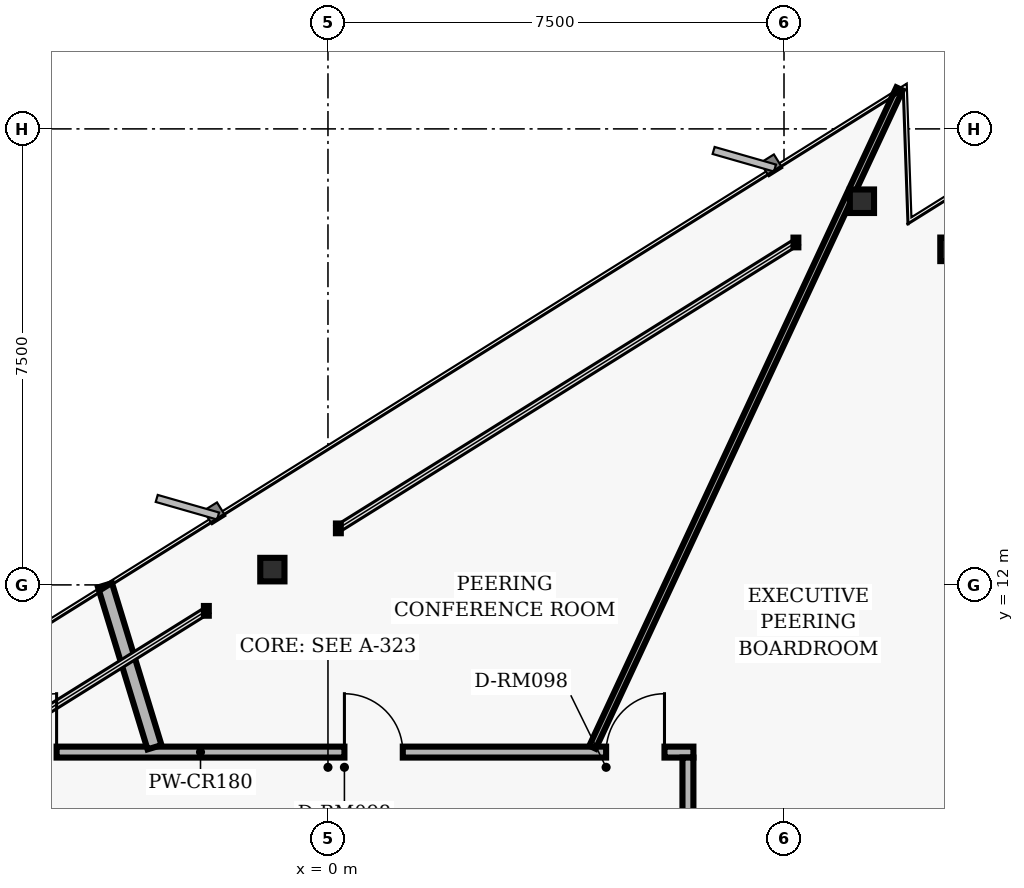
"""IFC4 building model, lengths in metres.
Left out: names, types, materials, properties, quantities, classifications, styles, units other than length and angle.
Written with IfcOpenShell. Run it as: python <this file> out.ifc"""

import sys

from ifc_helpers import new_model, si_unit, direction, frame, frame_2d, origin, origin_2d, place, context, subcontext, project, spatial, rectangle, i_section, extrude, element, fill, save


model = new_model("IFC4")
c1 = context("Model", 3, precision=1e-05, world=origin(), true_north=direction((0.0, 1.0)))
c2 = subcontext(c1, "Body", "Model", "MODEL_VIEW")
j1 = project(units=[si_unit("LENGTHUNIT", "METRE"), si_unit("PLANEANGLEUNIT", "RADIAN")], contexts=[c1])
p1 = place(None, origin())
s1 = spatial("IfcSite", under=j1, at=p1, CompositionType="ELEMENT")
p2 = place(p1, origin())
s2 = spatial("IfcBuilding", under=s1, at=p2, CompositionType="ELEMENT")
p3 = place(p2, frame((0.0, 0.0, 193.6)))
s3 = spatial("IfcBuildingStorey", under=s2, at=p3, CompositionType="ELEMENT", Elevation=193.6)
for number, where, z_axis, x_axis in (
    (1, (10.269, 17.519, 0.0), (0.0, 0.0, 1.0), (1.0, 0.0, 0.0)),
    (2, (8.781, 18.31, 0.0), (0.0, 0.0, 1.0), (1.0, 0.0, 0.0)),
    (3, (-0.915, 12.251, 0.0), (0.0, 0.0, 1.0), (1.0, 0.0, 0.0)),
):
    element("IfcColumn", number, at=place(p3, frame(where, z_axis=z_axis, x_axis=x_axis)), inside=s3, PredefinedType="COLUMN", context=c2, shape_type="SweptSolid", body=[
        extrude(i_section(OverallWidth=0.398, OverallDepth=0.387, WebThickness=0.021, FlangeThickness=0.033, FilletRadius=0.018, at=origin_2d()), origin(), (0.0, 0.0, 1.0), 3.04),
    ])
p4 = place(p3, frame((-7.29, 9.25, 0.0), z_axis=(0.0, 0.0, 1.0), x_axis=(1.0, 0.0, 0.0)))
e4 = element("IfcWall", 4, at=p4, inside=s3, PredefinedType="PARTITIONING", context=c2, shape_type="SweptSolid", body=[
    extrude(rectangle(XDim=13.3, YDim=0.18, at=frame_2d((6.65, 0.0))), origin(), (0.0, 0.0, 1.0), 2.773),
])
p5 = place(p4, frame((11.864, 0.0, 0.0)))
e5 = element("IfcOpeningElement", 5, at=p5, cuts=e4, PredefinedType="OPENING", context=c2, shape_type="SweptSolid", body=[
    extrude(rectangle(XDim=0.96, YDim=2.02, at=frame_2d((0.48, 1.01))), frame((0.0, 0.1, 0.0), z_axis=(0.0, -1.0, 0.0), x_axis=(1.0, 0.0, 0.0)), (0.0, 0.0, 1.0), 0.2),
])
p6 = place(p4, frame((7.561, 0.0, 0.0)))
e6 = element("IfcOpeningElement", 6, at=p6, cuts=e4, PredefinedType="OPENING", context=c2, shape_type="SweptSolid", body=[
    extrude(rectangle(XDim=0.96, YDim=2.02, at=frame_2d((0.48, 1.01))), frame((0.0, 0.1, 0.0), z_axis=(0.0, -1.0, 0.0), x_axis=(1.0, 0.0, 0.0)), (0.0, 0.0, 1.0), 0.2),
])
p7 = place(p4, frame((1.867, 0.0, 0.0)))
e7 = element("IfcOpeningElement", 7, at=p7, cuts=e4, PredefinedType="OPENING", context=c2, shape_type="SweptSolid", body=[
    extrude(rectangle(XDim=0.96, YDim=2.02, at=frame_2d((0.48, 1.01))), frame((0.0, 0.1, 0.0), z_axis=(0.0, -1.0, 0.0), x_axis=(1.0, 0.0, 0.0)), (0.0, 0.0, 1.0), 0.2),
])
p8 = place(p3, frame((5.92, 9.16, 0.0), z_axis=(0.0, 0.0, 1.0), x_axis=(0.0, -1.0, 0.0)))
e8 = element("IfcWall", 8, at=p8, inside=s3, PredefinedType="PARTITIONING", context=c2, shape_type="SweptSolid", body=[
    extrude(rectangle(XDim=1.8, YDim=0.18, at=frame_2d((0.9, 0.0))), origin(), (0.0, 0.0, 1.0), 2.773),
])
p9 = place(p3, frame((4.351, 9.33, 0.0), z_axis=(0.0, 0.0, 1.0), x_axis=(0.422616983209, 0.906308383225, 0.0)))
e9 = element("IfcWall", 9, at=p9, inside=s3, PredefinedType="MOVABLE", context=c2, shape_type="SweptSolid", body=[
    extrude(rectangle(XDim=11.948, YDim=0.115, at=frame_2d((5.974, 0.0))), origin(), (0.0, 0.0, 1.0), 2.253),
])
p10 = place(p3, frame((-2.853, 9.33, 0.0), z_axis=(0.0, 0.0, 1.0), x_axis=(-0.292329881005, 0.956317541757, 0.0)))
e10 = element("IfcWall", 10, at=p10, inside=s3, PredefinedType="PARTITIONING", context=c2, shape_type="SweptSolid", body=[
    extrude(rectangle(XDim=2.785, YDim=0.24, at=frame_2d((1.393, 0.0))), origin(), (0.0, 0.0, 1.0), 2.773),
])
p11 = place(p5, origin())
e11 = element("IfcDoor", 11, at=p11, inside=s3, OperationType="SINGLE_SWING_RIGHT", PredefinedType="DOOR", context=c2, shape_type="SweptSolid", body=[
    extrude(rectangle(XDim=0.96, YDim=2.02, at=frame_2d((0.48, 1.01))), frame((0.0, 0.025, 0.0), z_axis=(0.0, -1.0, 0.0), x_axis=(1.0, 0.0, 0.0)), (0.0, 0.0, 1.0), 0.05),
])
fill(e5, e11)
p12 = place(p6, origin())
e12 = element("IfcDoor", 12, at=p12, inside=s3, OperationType="SINGLE_SWING_LEFT", PredefinedType="DOOR", context=c2, shape_type="SweptSolid", body=[
    extrude(rectangle(XDim=0.96, YDim=2.02, at=frame_2d((0.48, 1.01))), frame((0.0, 0.025, 0.0), z_axis=(0.0, -1.0, 0.0), x_axis=(1.0, 0.0, 0.0)), (0.0, 0.0, 1.0), 0.05),
])
fill(e6, e12)
p13 = place(p7, origin())
e13 = element("IfcDoor", 13, at=p13, inside=s3, OperationType="SINGLE_SWING_RIGHT", PredefinedType="DOOR", context=c2, shape_type="SweptSolid", body=[
    extrude(rectangle(XDim=0.96, YDim=2.02, at=frame_2d((0.48, 1.01))), frame((0.0, 0.025, 0.0), z_axis=(0.0, -1.0, 0.0), x_axis=(1.0, 0.0, 0.0)), (0.0, 0.0, 1.0), 0.05),
])
fill(e7, e13)
save(model, sys.argv[1])
